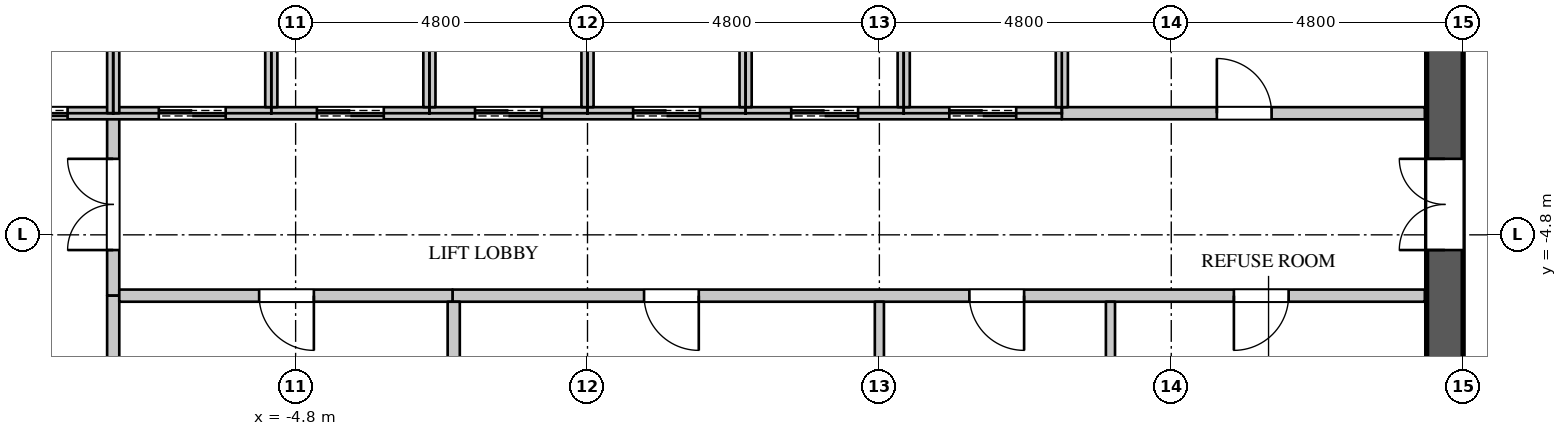
"""IFC4 building model, lengths in metres.
Left out: names, types, materials, properties, quantities, classifications, styles, units other than length and angle.
Written with IfcOpenShell. Run it as: python <this file> out.ifc"""

import sys

from ifc_helpers import new_model, si_unit, direction, frame, frame_2d, origin, place, context, subcontext, project, spatial, rectangle, extrude, element, fill, save


model = new_model("IFC4")
c1 = context("Model", 3, precision=1e-05, world=origin(), true_north=direction((0.0, 1.0)))
c2 = subcontext(c1, "Body", "Model", "MODEL_VIEW")
j1 = project(units=[si_unit("LENGTHUNIT", "METRE"), si_unit("PLANEANGLEUNIT", "RADIAN")], contexts=[c1])
p1 = place(None, origin())
s1 = spatial("IfcSite", under=j1, at=p1, CompositionType="ELEMENT")
p2 = place(p1, origin())
s2 = spatial("IfcBuilding", under=s1, at=p2, CompositionType="ELEMENT")
p3 = place(p2, frame((0.0, 0.0, 293.7)))
s3 = spatial("IfcBuildingStorey", under=s2, at=p3, CompositionType="ELEMENT", Elevation=293.7)
p4 = place(p3, frame((14.1, -11.4, 0.0), z_axis=(0.0, 0.0, 1.0), x_axis=(0.0, 1.0, 0.0)))
e1 = element("IfcWall", 1, at=p4, inside=s3, PredefinedType="SHEAR", context=c2, shape_type="SweptSolid", body=[
    extrude(rectangle(XDim=22.8, YDim=0.6, at=frame_2d((11.4, 0.0))), origin(), (0.0, 0.0, 1.0), 4.2),
])
p5 = place(p4, frame((20.45, 0.0, 0.0)))
e2 = element("IfcOpeningElement", 2, at=p5, cuts=e1, PredefinedType="OPENING", context=c2, shape_type="SweptSolid", body=[
    extrude(rectangle(XDim=1.1, YDim=2.2, at=frame_2d((0.55, 1.1))), frame((0.0, 0.31, 0.0), z_axis=(0.0, -1.0, 0.0), x_axis=(1.0, 0.0, 0.0)), (0.0, 0.0, 1.0), 0.62),
])
p6 = place(p4, frame((1.25, 0.0, 0.0)))
e3 = element("IfcOpeningElement", 3, at=p6, cuts=e1, PredefinedType="OPENING", context=c2, shape_type="SweptSolid", body=[
    extrude(rectangle(XDim=1.1, YDim=2.2, at=frame_2d((0.55, 1.1))), frame((0.0, 0.31, 0.0), z_axis=(0.0, -1.0, 0.0), x_axis=(1.0, 0.0, 0.0)), (0.0, 0.0, 1.0), 0.62),
])
p7 = place(p4, frame((14.95, 0.0, 0.0)))
e4 = element("IfcOpeningElement", 4, at=p7, cuts=e1, PredefinedType="OPENING", context=c2, shape_type="SweptSolid", body=[
    extrude(rectangle(XDim=1.5, YDim=2.4, at=frame_2d((0.75, 1.2))), frame((0.0, 0.31, 0.0), z_axis=(0.0, -1.0, 0.0), x_axis=(1.0, 0.0, 0.0)), (0.0, 0.0, 1.0), 0.62),
])
p8 = place(p4, frame((6.35, 0.0, 0.0)))
e5 = element("IfcOpeningElement", 5, at=p8, cuts=e1, PredefinedType="OPENING", context=c2, shape_type="SweptSolid", body=[
    extrude(rectangle(XDim=1.5, YDim=2.4, at=frame_2d((0.75, 1.2))), frame((0.0, 0.31, 0.0), z_axis=(0.0, -1.0, 0.0), x_axis=(1.0, 0.0, 0.0)), (0.0, 0.0, 1.0), 0.62),
])
p9 = place(p3, frame((-7.8, -5.8, 0.0), z_axis=(0.0, 0.0, 1.0), x_axis=(0.0, 1.0, 0.0)))
e6 = element("IfcWall", 6, at=p9, inside=s3, PredefinedType="PARTITIONING", context=c2, shape_type="SweptSolid", body=[
    extrude(rectangle(XDim=3.0, YDim=0.2, at=frame_2d((1.5, 0.0))), origin(), (0.0, 0.0, 1.0), 3.95),
])
p10 = place(p9, frame((0.75, 0.0, 0.0)))
e7 = element("IfcOpeningElement", 7, at=p10, cuts=e6, PredefinedType="OPENING", context=c2, shape_type="SweptSolid", body=[
    extrude(rectangle(XDim=1.5, YDim=2.4, at=frame_2d((0.75, 1.2))), frame((0.0, 0.11, 0.0), z_axis=(0.0, -1.0, 0.0), x_axis=(1.0, 0.0, 0.0)), (0.0, 0.0, 1.0), 0.22),
])
p11 = place(p3, frame((-2.22, -5.8, 0.0), z_axis=(0.0, 0.0, 1.0), x_axis=(1.0, 0.0, 0.0)))
e8 = element("IfcWall", 8, at=p11, inside=s3, PredefinedType="PARTITIONING", context=c2, shape_type="SweptSolid", body=[
    extrude(rectangle(XDim=15.99, YDim=0.2, at=frame_2d((7.995, 0.0))), origin(), (0.0, 0.0, 1.0), 3.95),
])
p12 = place(p11, frame((3.15, 0.0, 0.0)))
e9 = element("IfcOpeningElement", 9, at=p12, cuts=e8, PredefinedType="OPENING", context=c2, shape_type="SweptSolid", body=[
    extrude(rectangle(XDim=0.9, YDim=2.2, at=frame_2d((0.45, 1.1))), frame((0.0, 0.11, 0.0), z_axis=(0.0, -1.0, 0.0), x_axis=(1.0, 0.0, 0.0)), (0.0, 0.0, 1.0), 0.22),
])
p13 = place(p11, frame((8.5, 0.0, 0.0)))
e10 = element("IfcOpeningElement", 10, at=p13, cuts=e8, PredefinedType="OPENING", context=c2, shape_type="SweptSolid", body=[
    extrude(rectangle(XDim=0.9, YDim=2.2, at=frame_2d((0.45, 1.1))), frame((0.0, 0.11, 0.0), z_axis=(0.0, -1.0, 0.0), x_axis=(1.0, 0.0, 0.0)), (0.0, 0.0, 1.0), 0.22),
])
p14 = place(p11, frame((12.85, 0.0, 0.0)))
e11 = element("IfcOpeningElement", 11, at=p14, cuts=e8, PredefinedType="OPENING", context=c2, shape_type="SweptSolid", body=[
    extrude(rectangle(XDim=0.9, YDim=2.2, at=frame_2d((0.45, 1.1))), frame((0.0, 0.11, 0.0), z_axis=(0.0, -1.0, 0.0), x_axis=(1.0, 0.0, 0.0)), (0.0, 0.0, 1.0), 0.22),
])
p15 = place(p3, frame((4.8, -11.37, 0.0), z_axis=(0.0, 0.0, 1.0), x_axis=(0.0, 1.0, 0.0)))
e12 = element("IfcWall", 12, at=p15, inside=s3, PredefinedType="PARTITIONING", context=c2, shape_type="SweptSolid", body=[
    extrude(rectangle(XDim=5.47, YDim=0.15, at=frame_2d((2.735, 0.0))), origin(), (0.0, 0.0, 1.0), 3.95),
])
p16 = place(p3, frame((8.6, -8.075, 0.0), z_axis=(0.0, 0.0, 1.0), x_axis=(0.0, 1.0, 0.0)))
e13 = element("IfcWall", 13, at=p16, inside=s3, PredefinedType="PARTITIONING", context=c2, shape_type="SweptSolid", body=[
    extrude(rectangle(XDim=2.175, YDim=0.15, at=frame_2d((1.087, 0.0))), origin(), (0.0, 0.0, 1.0), 3.95),
])
p17 = place(p3, frame((-7.8, -8.075, 0.0), z_axis=(0.0, 0.0, 1.0), x_axis=(0.0, 1.0, 0.0)))
e14 = element("IfcWall", 14, at=p17, inside=s3, PredefinedType="PARTITIONING", context=c2, shape_type="SweptSolid", body=[
    extrude(rectangle(XDim=2.275, YDim=0.2, at=frame_2d((1.137, 0.0))), origin(), (0.0, 0.0, 1.0), 3.95),
])
p18 = place(p3, frame((-7.7, -5.8, 0.0), z_axis=(0.0, 0.0, 1.0), x_axis=(1.0, 0.0, 0.0)))
e15 = element("IfcWall", 15, at=p18, inside=s3, PredefinedType="PARTITIONING", context=c2, shape_type="SweptSolid", body=[
    extrude(rectangle(XDim=5.48, YDim=0.2, at=frame_2d((2.74, 0.0))), origin(), (0.0, 0.0, 1.0), 3.95),
])
p19 = place(p18, frame((2.3, 0.0, 0.0)))
e16 = element("IfcOpeningElement", 16, at=p19, cuts=e15, PredefinedType="OPENING", context=c2, shape_type="SweptSolid", body=[
    extrude(rectangle(XDim=0.9, YDim=2.2, at=frame_2d((0.45, 1.1))), frame((0.0, 0.11, 0.0), z_axis=(0.0, -1.0, 0.0), x_axis=(1.0, 0.0, 0.0)), (0.0, 0.0, 1.0), 0.22),
])
p20 = place(p3, frame((-2.2, -11.37, 0.0), z_axis=(0.0, 0.0, 1.0), x_axis=(0.0, 1.0, 0.0)))
e17 = element("IfcWall", 17, at=p20, inside=s3, PredefinedType="PARTITIONING", context=c2, shape_type="SweptSolid", body=[
    extrude(rectangle(XDim=5.47, YDim=0.2, at=frame_2d((2.735, 0.0))), origin(), (0.0, 0.0, 1.0), 3.95),
])
p21 = place(p3, frame((7.8, -2.8, 0.0), z_axis=(0.0, 0.0, 1.0), x_axis=(1.0, 0.0, 0.0)))
e18 = element("IfcWall", 18, at=p21, inside=s3, PredefinedType="PARTITIONING", context=c2, shape_type="SweptSolid", body=[
    extrude(rectangle(XDim=5.97, YDim=0.2, at=frame_2d((2.985, 0.0))), origin(), (0.0, 0.0, 1.0), 3.95),
])
p22 = place(p21, frame((2.55, 0.0, 0.0)))
e19 = element("IfcOpeningElement", 19, at=p22, cuts=e18, PredefinedType="OPENING", context=c2, shape_type="SweptSolid", body=[
    extrude(rectangle(XDim=0.9, YDim=2.2, at=frame_2d((0.45, 1.1))), frame((0.0, 0.11, 0.0), z_axis=(0.0, -1.0, 0.0), x_axis=(1.0, 0.0, 0.0)), (0.0, 0.0, 1.0), 0.22),
])
p23 = place(p3, frame((-10.4, -2.8, 0.0), z_axis=(0.0, 0.0, 1.0), x_axis=(1.0, 0.0, 0.0)))
e20 = element("IfcWall", 20, at=p23, inside=s3, PredefinedType="PARTITIONING", context=c2, shape_type="SweptSolid", body=[
    extrude(rectangle(XDim=18.2, YDim=0.2, at=frame_2d((9.1, 0.0))), origin(), (0.0, 0.0, 1.0), 3.95),
])
p24 = place(p23, frame((0.75, 0.0, 0.0)))
e21 = element("IfcOpeningElement", 21, at=p24, cuts=e20, PredefinedType="OPENING", context=c2, shape_type="SweptSolid", body=[
    extrude(rectangle(XDim=1.1, YDim=2.2, at=frame_2d((0.55, 1.1))), frame((0.0, 0.11, 0.0), z_axis=(0.0, -1.0, 0.0), x_axis=(1.0, 0.0, 0.0)), (0.0, 0.0, 1.0), 0.22),
])
p25 = place(p23, frame((3.35, 0.0, 0.0)))
e22 = element("IfcOpeningElement", 22, at=p25, cuts=e20, PredefinedType="OPENING", context=c2, shape_type="SweptSolid", body=[
    extrude(rectangle(XDim=1.1, YDim=2.2, at=frame_2d((0.55, 1.1))), frame((0.0, 0.11, 0.0), z_axis=(0.0, -1.0, 0.0), x_axis=(1.0, 0.0, 0.0)), (0.0, 0.0, 1.0), 0.22),
])
p26 = place(p23, frame((5.95, 0.0, 0.0)))
e23 = element("IfcOpeningElement", 23, at=p26, cuts=e20, PredefinedType="OPENING", context=c2, shape_type="SweptSolid", body=[
    extrude(rectangle(XDim=1.1, YDim=2.2, at=frame_2d((0.55, 1.1))), frame((0.0, 0.11, 0.0), z_axis=(0.0, -1.0, 0.0), x_axis=(1.0, 0.0, 0.0)), (0.0, 0.0, 1.0), 0.22),
])
p27 = place(p23, frame((8.55, 0.0, 0.0)))
e24 = element("IfcOpeningElement", 24, at=p27, cuts=e20, PredefinedType="OPENING", context=c2, shape_type="SweptSolid", body=[
    extrude(rectangle(XDim=1.1, YDim=2.2, at=frame_2d((0.55, 1.1))), frame((0.0, 0.11, 0.0), z_axis=(0.0, -1.0, 0.0), x_axis=(1.0, 0.0, 0.0)), (0.0, 0.0, 1.0), 0.22),
])
p28 = place(p23, frame((11.15, 0.0, 0.0)))
e25 = element("IfcOpeningElement", 25, at=p28, cuts=e20, PredefinedType="OPENING", context=c2, shape_type="SweptSolid", body=[
    extrude(rectangle(XDim=1.1, YDim=2.2, at=frame_2d((0.55, 1.1))), frame((0.0, 0.11, 0.0), z_axis=(0.0, -1.0, 0.0), x_axis=(1.0, 0.0, 0.0)), (0.0, 0.0, 1.0), 0.22),
])
p29 = place(p23, frame((13.75, 0.0, 0.0)))
e26 = element("IfcOpeningElement", 26, at=p29, cuts=e20, PredefinedType="OPENING", context=c2, shape_type="SweptSolid", body=[
    extrude(rectangle(XDim=1.1, YDim=2.2, at=frame_2d((0.55, 1.1))), frame((0.0, 0.11, 0.0), z_axis=(0.0, -1.0, 0.0), x_axis=(1.0, 0.0, 0.0)), (0.0, 0.0, 1.0), 0.22),
])
p30 = place(p23, frame((16.35, 0.0, 0.0)))
e27 = element("IfcOpeningElement", 27, at=p30, cuts=e20, PredefinedType="OPENING", context=c2, shape_type="SweptSolid", body=[
    extrude(rectangle(XDim=1.1, YDim=2.2, at=frame_2d((0.55, 1.1))), frame((0.0, 0.11, 0.0), z_axis=(0.0, -1.0, 0.0), x_axis=(1.0, 0.0, 0.0)), (0.0, 0.0, 1.0), 0.22),
])
p31 = place(p3, frame((-7.8, -2.8, 0.0), z_axis=(0.0, 0.0, 1.0), x_axis=(0.0, 1.0, 0.0)))
e28 = element("IfcWall", 28, at=p31, inside=s3, PredefinedType="PARTITIONING", context=c2, shape_type="SweptSolid", body=[
    extrude(rectangle(XDim=2.8, YDim=0.2, at=frame_2d((1.4, 0.0))), origin(), (0.0, 0.0, 1.0), 3.95),
])
for number, where, z_axis, x_axis in (
    (29, (-5.2, -2.7, 0.0), (0.0, 0.0, 1.0), (0.0, 1.0, 0.0)),
    (30, (-2.6, -2.7, 0.0), (0.0, 0.0, 1.0), (0.0, 1.0, 0.0)),
    (31, (0.0, -2.7, 0.0), (0.0, 0.0, 1.0), (0.0, 1.0, 0.0)),
    (32, (2.6, -2.7, 0.0), (0.0, 0.0, 1.0), (0.0, 1.0, 0.0)),
    (33, (5.2, -2.7, 0.0), (0.0, 0.0, 1.0), (0.0, 1.0, 0.0)),
    (34, (7.8, -2.7, 0.0), (0.0, 0.0, 1.0), (0.0, 1.0, 0.0)),
):
    element("IfcWall", number, at=place(p3, frame(where, z_axis=z_axis, x_axis=x_axis)), inside=s3, PredefinedType="PARTITIONING", context=c2, shape_type="SweptSolid", body=[
        extrude(rectangle(XDim=2.6, YDim=0.2, at=frame_2d((1.3, 0.0))), origin(), (0.0, 0.0, 1.0), 3.95),
    ])
p32 = place(p22, origin())
e35 = element("IfcDoor", 35, at=p32, inside=s3, OperationType="SINGLE_SWING_LEFT", PredefinedType="DOOR", context=c2, shape_type="SweptSolid", body=[
    extrude(rectangle(XDim=0.9, YDim=2.2, at=frame_2d((0.45, 1.1))), frame((0.0, 0.025, 0.0), z_axis=(0.0, -1.0, 0.0), x_axis=(1.0, 0.0, 0.0)), (0.0, 0.0, 1.0), 0.05),
])
fill(e19, e35)
p33 = place(p19, origin())
e36 = element("IfcDoor", 36, at=p33, inside=s3, OperationType="SINGLE_SWING_LEFT", PredefinedType="DOOR", context=c2, shape_type="SweptSolid", body=[
    extrude(rectangle(XDim=0.9, YDim=2.2, at=frame_2d((0.45, 1.1))), frame((0.0, 0.025, 0.0), z_axis=(0.0, -1.0, 0.0), x_axis=(1.0, 0.0, 0.0)), (0.0, 0.0, 1.0), 0.05),
])
fill(e16, e36)
p34 = place(p12, origin())
e37 = element("IfcDoor", 37, at=p34, inside=s3, OperationType="SINGLE_SWING_LEFT", PredefinedType="DOOR", context=c2, shape_type="SweptSolid", body=[
    extrude(rectangle(XDim=0.9, YDim=2.2, at=frame_2d((0.45, 1.1))), frame((0.0, 0.025, 0.0), z_axis=(0.0, -1.0, 0.0), x_axis=(1.0, 0.0, 0.0)), (0.0, 0.0, 1.0), 0.05),
])
fill(e9, e37)
p35 = place(p13, origin())
e38 = element("IfcDoor", 38, at=p35, inside=s3, OperationType="SINGLE_SWING_LEFT", PredefinedType="DOOR", context=c2, shape_type="SweptSolid", body=[
    extrude(rectangle(XDim=0.9, YDim=2.2, at=frame_2d((0.45, 1.1))), frame((0.0, 0.025, 0.0), z_axis=(0.0, -1.0, 0.0), x_axis=(1.0, 0.0, 0.0)), (0.0, 0.0, 1.0), 0.05),
])
fill(e10, e38)
p36 = place(p14, origin())
e39 = element("IfcDoor", 39, at=p36, inside=s3, OperationType="SINGLE_SWING_RIGHT", PredefinedType="DOOR", context=c2, shape_type="SweptSolid", body=[
    extrude(rectangle(XDim=0.9, YDim=2.2, at=frame_2d((0.45, 1.1))), frame((0.0, 0.025, 0.0), z_axis=(0.0, -1.0, 0.0), x_axis=(1.0, 0.0, 0.0)), (0.0, 0.0, 1.0), 0.05),
])
fill(e11, e39)
p37 = place(p24, origin())
e40 = element("IfcDoor", 40, at=p37, inside=s3, OperationType="DOUBLE_DOOR_SLIDING", PredefinedType="DOOR", context=c2, shape_type="SweptSolid", body=[
    extrude(rectangle(XDim=1.1, YDim=2.2, at=frame_2d((0.55, 1.1))), frame((0.0, 0.025, 0.0), z_axis=(0.0, -1.0, 0.0), x_axis=(1.0, 0.0, 0.0)), (0.0, 0.0, 1.0), 0.05),
])
fill(e21, e40)
p38 = place(p25, origin())
e41 = element("IfcDoor", 41, at=p38, inside=s3, OperationType="DOUBLE_DOOR_SLIDING", PredefinedType="DOOR", context=c2, shape_type="SweptSolid", body=[
    extrude(rectangle(XDim=1.1, YDim=2.2, at=frame_2d((0.55, 1.1))), frame((0.0, 0.025, 0.0), z_axis=(0.0, -1.0, 0.0), x_axis=(1.0, 0.0, 0.0)), (0.0, 0.0, 1.0), 0.05),
])
fill(e22, e41)
p39 = place(p26, origin())
e42 = element("IfcDoor", 42, at=p39, inside=s3, OperationType="DOUBLE_DOOR_SLIDING", PredefinedType="DOOR", context=c2, shape_type="SweptSolid", body=[
    extrude(rectangle(XDim=1.1, YDim=2.2, at=frame_2d((0.55, 1.1))), frame((0.0, 0.025, 0.0), z_axis=(0.0, -1.0, 0.0), x_axis=(1.0, 0.0, 0.0)), (0.0, 0.0, 1.0), 0.05),
])
fill(e23, e42)
p40 = place(p27, origin())
e43 = element("IfcDoor", 43, at=p40, inside=s3, OperationType="DOUBLE_DOOR_SLIDING", PredefinedType="DOOR", context=c2, shape_type="SweptSolid", body=[
    extrude(rectangle(XDim=1.1, YDim=2.2, at=frame_2d((0.55, 1.1))), frame((0.0, 0.025, 0.0), z_axis=(0.0, -1.0, 0.0), x_axis=(1.0, 0.0, 0.0)), (0.0, 0.0, 1.0), 0.05),
])
fill(e24, e43)
p41 = place(p28, origin())
e44 = element("IfcDoor", 44, at=p41, inside=s3, OperationType="DOUBLE_DOOR_SLIDING", PredefinedType="DOOR", context=c2, shape_type="SweptSolid", body=[
    extrude(rectangle(XDim=1.1, YDim=2.2, at=frame_2d((0.55, 1.1))), frame((0.0, 0.025, 0.0), z_axis=(0.0, -1.0, 0.0), x_axis=(1.0, 0.0, 0.0)), (0.0, 0.0, 1.0), 0.05),
])
fill(e25, e44)
p42 = place(p29, origin())
e45 = element("IfcDoor", 45, at=p42, inside=s3, OperationType="DOUBLE_DOOR_SLIDING", PredefinedType="DOOR", context=c2, shape_type="SweptSolid", body=[
    extrude(rectangle(XDim=1.1, YDim=2.2, at=frame_2d((0.55, 1.1))), frame((0.0, 0.025, 0.0), z_axis=(0.0, -1.0, 0.0), x_axis=(1.0, 0.0, 0.0)), (0.0, 0.0, 1.0), 0.05),
])
fill(e26, e45)
p43 = place(p30, origin())
e46 = element("IfcDoor", 46, at=p43, inside=s3, OperationType="DOUBLE_DOOR_SLIDING", PredefinedType="DOOR", context=c2, shape_type="SweptSolid", body=[
    extrude(rectangle(XDim=1.1, YDim=2.2, at=frame_2d((0.55, 1.1))), frame((0.0, 0.025, 0.0), z_axis=(0.0, -1.0, 0.0), x_axis=(1.0, 0.0, 0.0)), (0.0, 0.0, 1.0), 0.05),
])
fill(e27, e46)
p44 = place(p10, origin())
e47 = element("IfcDoor", 47, at=p44, inside=s3, OperationType="DOUBLE_DOOR_SINGLE_SWING", PredefinedType="DOOR", context=c2, shape_type="SweptSolid", body=[
    extrude(rectangle(XDim=1.5, YDim=2.4, at=frame_2d((0.75, 1.2))), frame((0.0, 0.025, 0.0), z_axis=(0.0, -1.0, 0.0), x_axis=(1.0, 0.0, 0.0)), (0.0, 0.0, 1.0), 0.05),
])
fill(e7, e47)
p45 = place(p8, origin())
e48 = element("IfcDoor", 48, at=p45, inside=s3, OperationType="DOUBLE_DOOR_SINGLE_SWING", PredefinedType="DOOR", context=c2, shape_type="SweptSolid", body=[
    extrude(rectangle(XDim=1.5, YDim=2.4, at=frame_2d((0.75, 1.2))), frame((0.0, 0.295, 0.0), z_axis=(0.0, -1.0, 0.0), x_axis=(1.0, 0.0, 0.0)), (0.0, 0.0, 1.0), 0.05),
])
fill(e5, e48)
save(model, sys.argv[1])
